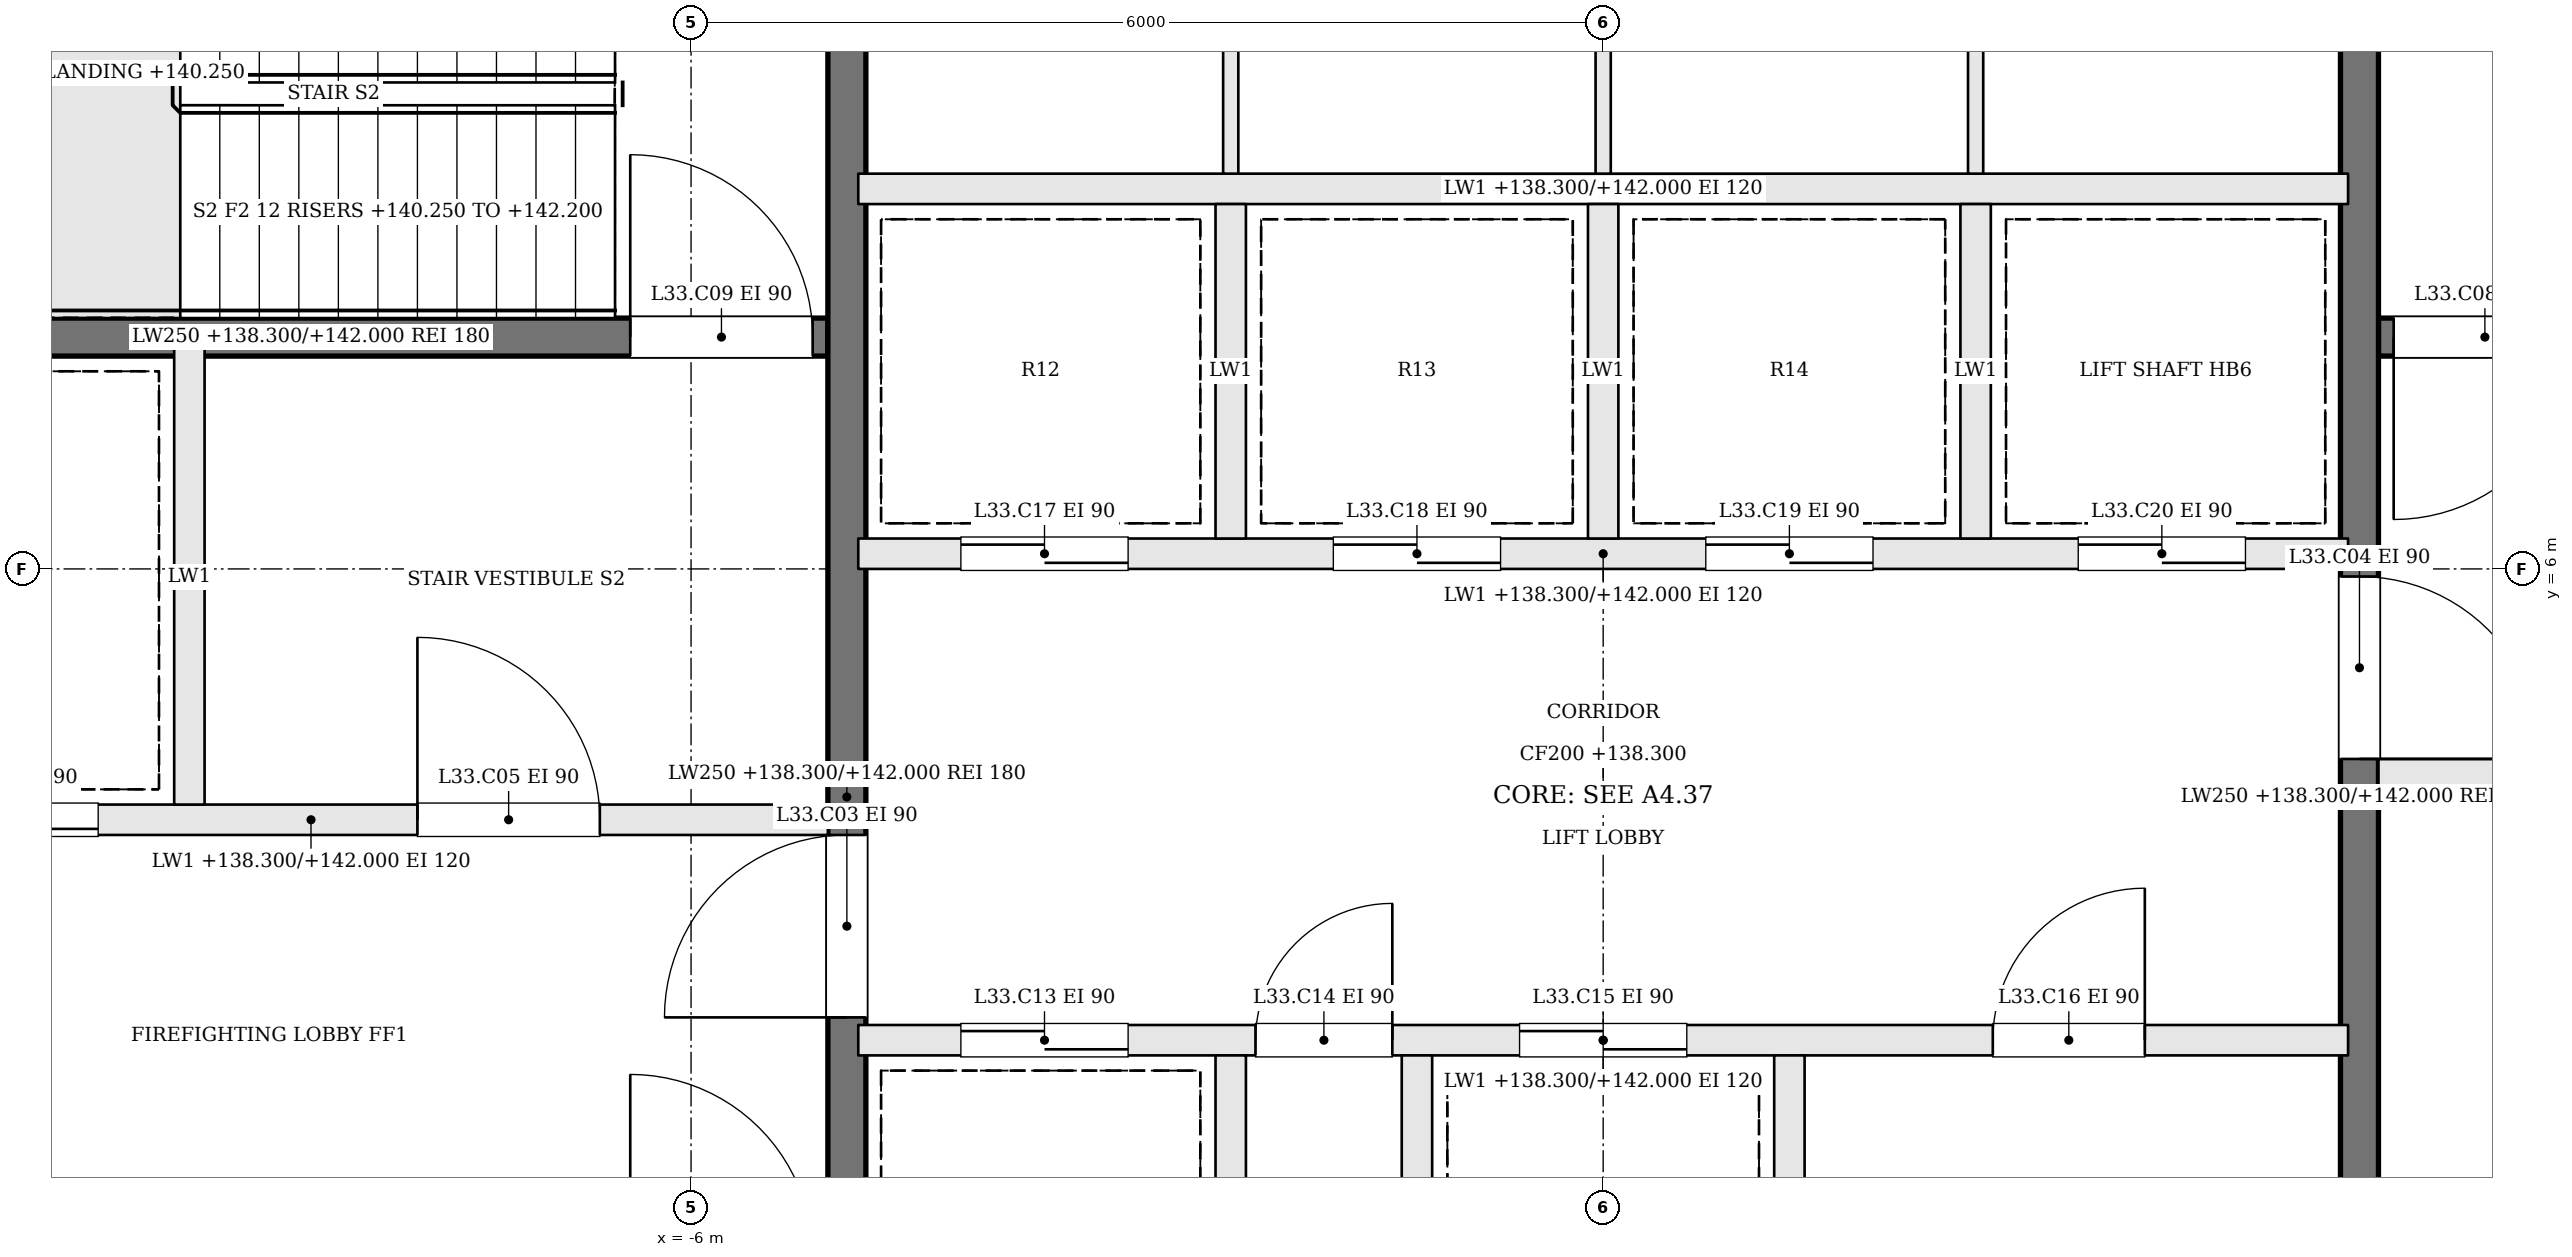
"""IFC4 building model, lengths in metres.
Left out: names, types, materials, properties, quantities, classifications, styles, units other than length and angle.
Written with IfcOpenShell. Run it as: python <this file> out.ifc"""

import sys

from ifc_helpers import new_model, si_unit, direction, frame, frame_2d, origin, place, context, subcontext, project, spatial, rectangle, extrude, element, fill, save


model = new_model("IFC4")
c1 = context("Model", 3, precision=1e-05, world=origin(), true_north=direction((0.0, 1.0)))
c2 = subcontext(c1, "Body", "Model", "MODEL_VIEW")
j1 = project(units=[si_unit("LENGTHUNIT", "METRE"), si_unit("PLANEANGLEUNIT", "RADIAN")], contexts=[c1])
p1 = place(None, origin())
s1 = spatial("IfcSite", under=j1, at=p1, CompositionType="ELEMENT")
p2 = place(p1, origin())
s2 = spatial("IfcBuilding", under=s1, at=p2, CompositionType="ELEMENT")
p3 = place(p2, frame((0.0, 0.0, 138.3)))
s3 = spatial("IfcBuildingStorey", under=s2, at=p3, CompositionType="ELEMENT", Elevation=138.3)
p4 = place(p3, frame((11.9, 7.525, 0.0), z_axis=(0.0, 0.0, 1.0), x_axis=(-1.0, 0.0, 0.0)))
e1 = element("IfcWall", 1, at=p4, inside=s3, PredefinedType="SOLIDWALL", context=c2, shape_type="SweptSolid", body=[
    extrude(rectangle(XDim=6.8, YDim=0.25, at=frame_2d((3.4, 0.0))), origin(), (0.0, 0.0, 1.0), 3.7),
])
p5 = place(p4, frame((5.5, 0.0, 0.0)))
e2 = element("IfcOpeningElement", 2, at=p5, cuts=e1, PredefinedType="OPENING", context=c2, shape_type="SweptSolid", body=[
    extrude(rectangle(XDim=1.2, YDim=2.1, at=frame_2d((0.6, 1.05))), frame((0.0, 0.135, 0.0), z_axis=(0.0, -1.0, 0.0), x_axis=(1.0, 0.0, 0.0)), (0.0, 0.0, 1.0), 0.27),
])
p6 = place(p3, frame((-11.9, 4.35, 0.0), z_axis=(0.0, 0.0, 1.0), x_axis=(1.0, 0.0, 0.0)))
e3 = element("IfcWall", 3, at=p6, inside=s3, PredefinedType="SOLIDWALL", context=c2, shape_type="SweptSolid", body=[
    extrude(rectangle(XDim=6.8, YDim=0.2, at=frame_2d((3.4, 0.0))), origin(), (0.0, 0.0, 1.0), 3.7),
])
p7 = place(p6, frame((4.1, 0.0, 0.0)))
e4 = element("IfcOpeningElement", 4, at=p7, cuts=e3, PredefinedType="OPENING", context=c2, shape_type="SweptSolid", body=[
    extrude(rectangle(XDim=1.2, YDim=2.1, at=frame_2d((0.6, 1.05))), frame((0.0, 0.11, 0.0), z_axis=(0.0, -1.0, 0.0), x_axis=(1.0, 0.0, 0.0)), (0.0, 0.0, 1.0), 0.22),
])
p8 = place(p6, frame((0.8, 0.0, 0.0)))
e5 = element("IfcOpeningElement", 5, at=p8, cuts=e3, PredefinedType="OPENING", context=c2, shape_type="SweptSolid", body=[
    extrude(rectangle(XDim=1.2, YDim=2.1, at=frame_2d((0.6, 1.05))), frame((0.0, 0.11, 0.0), z_axis=(0.0, -1.0, 0.0), x_axis=(1.0, 0.0, 0.0)), (0.0, 0.0, 1.0), 0.22),
])
p9 = place(p3, frame((11.9, 4.65, 0.0), z_axis=(0.0, 0.0, 1.0), x_axis=(-1.0, 0.0, 0.0)))
e6 = element("IfcWall", 6, at=p9, inside=s3, PredefinedType="SOLIDWALL", context=c2, shape_type="SweptSolid", body=[
    extrude(rectangle(XDim=6.8, YDim=0.2, at=frame_2d((3.4, 0.0))), origin(), (0.0, 0.0, 1.0), 3.7),
])
p10 = place(p9, frame((4.1, 0.0, 0.0)))
e7 = element("IfcOpeningElement", 7, at=p10, cuts=e6, PredefinedType="OPENING", context=c2, shape_type="SweptSolid", body=[
    extrude(rectangle(XDim=1.2, YDim=2.1, at=frame_2d((0.6, 1.05))), frame((0.0, 0.11, 0.0), z_axis=(0.0, -1.0, 0.0), x_axis=(1.0, 0.0, 0.0)), (0.0, 0.0, 1.0), 0.22),
])
p11 = place(p9, frame((0.8, 0.0, 0.0)))
e8 = element("IfcOpeningElement", 8, at=p11, cuts=e6, PredefinedType="OPENING", context=c2, shape_type="SweptSolid", body=[
    extrude(rectangle(XDim=1.2, YDim=2.1, at=frame_2d((0.6, 1.05))), frame((0.0, 0.11, 0.0), z_axis=(0.0, -1.0, 0.0), x_axis=(1.0, 0.0, 0.0)), (0.0, 0.0, 1.0), 0.22),
])
p12 = place(p3, frame((-11.9, 7.525, 0.0), z_axis=(0.0, 0.0, 1.0), x_axis=(1.0, 0.0, 0.0)))
e9 = element("IfcWall", 9, at=p12, inside=s3, PredefinedType="SOLIDWALL", context=c2, shape_type="SweptSolid", body=[
    extrude(rectangle(XDim=6.8, YDim=0.25, at=frame_2d((3.4, 0.0))), origin(), (0.0, 0.0, 1.0), 3.7),
])
p13 = place(p12, frame((5.5, 0.0, 0.0)))
e10 = element("IfcOpeningElement", 10, at=p13, cuts=e9, PredefinedType="OPENING", context=c2, shape_type="SweptSolid", body=[
    extrude(rectangle(XDim=1.2, YDim=2.1, at=frame_2d((0.6, 1.05))), frame((0.0, 0.135, 0.0), z_axis=(0.0, -1.0, 0.0), x_axis=(1.0, 0.0, 0.0)), (0.0, 0.0, 1.0), 0.27),
])
p14 = place(p3, frame((-9.3, 4.45, 0.0), z_axis=(0.0, 0.0, 1.0), x_axis=(0.0, 1.0, 0.0)))
e11 = element("IfcWall", 11, at=p14, inside=s3, PredefinedType="SOLIDWALL", context=c2, shape_type="SweptSolid", body=[
    extrude(rectangle(XDim=3.0, YDim=0.2, at=frame_2d((1.5, 0.0))), origin(), (0.0, 0.0, 1.0), 3.7),
])
p15 = place(p3, frame((-4.975, -1.9, 0.0), z_axis=(0.0, 0.0, 1.0), x_axis=(0.0, 1.0, 0.0)))
e12 = element("IfcWall", 12, at=p15, inside=s3, PredefinedType="SOLIDWALL", context=c2, shape_type="SweptSolid", body=[
    extrude(rectangle(XDim=12.8, YDim=0.25, at=frame_2d((6.4, 0.0))), origin(), (0.0, 0.0, 1.0), 3.7),
])
p16 = place(p15, frame((4.95, 0.0, 0.0)))
e13 = element("IfcOpeningElement", 13, at=p16, cuts=e12, PredefinedType="OPENING", context=c2, shape_type="SweptSolid", body=[
    extrude(rectangle(XDim=1.2, YDim=2.1, at=frame_2d((0.6, 1.05))), frame((0.0, 0.135, 0.0), z_axis=(0.0, -1.0, 0.0), x_axis=(1.0, 0.0, 0.0)), (0.0, 0.0, 1.0), 0.27),
])
p17 = place(p3, frame((4.975, 10.9, 0.0), z_axis=(0.0, 0.0, 1.0), x_axis=(0.0, -1.0, 0.0)))
e14 = element("IfcWall", 14, at=p17, inside=s3, PredefinedType="SOLIDWALL", context=c2, shape_type="SweptSolid", body=[
    extrude(rectangle(XDim=12.8, YDim=0.25, at=frame_2d((6.4, 0.0))), origin(), (0.0, 0.0, 1.0), 3.7),
])
p18 = place(p17, frame((4.95, 0.0, 0.0)))
e15 = element("IfcOpeningElement", 15, at=p18, cuts=e14, PredefinedType="OPENING", context=c2, shape_type="SweptSolid", body=[
    extrude(rectangle(XDim=1.2, YDim=2.1, at=frame_2d((0.6, 1.05))), frame((0.0, 0.135, 0.0), z_axis=(0.0, -1.0, 0.0), x_axis=(1.0, 0.0, 0.0)), (0.0, 0.0, 1.0), 0.27),
])
p19 = place(p3, frame((-4.9, 2.9, 0.0), z_axis=(0.0, 0.0, 1.0), x_axis=(1.0, 0.0, 0.0)))
e16 = element("IfcWall", 16, at=p19, inside=s3, PredefinedType="SOLIDWALL", context=c2, shape_type="SweptSolid", body=[
    extrude(rectangle(XDim=9.8, YDim=0.2, at=frame_2d((4.9, 0.0))), origin(), (0.0, 0.0, 1.0), 3.7),
])
p20 = place(p19, frame((0.675, 0.0, 0.0)))
e17 = element("IfcOpeningElement", 17, at=p20, cuts=e16, PredefinedType="OPENING", context=c2, shape_type="SweptSolid", body=[
    extrude(rectangle(XDim=1.1, YDim=2.1, at=frame_2d((0.55, 1.05))), frame((0.0, 0.11, 0.0), z_axis=(0.0, -1.0, 0.0), x_axis=(1.0, 0.0, 0.0)), (0.0, 0.0, 1.0), 0.22),
])
p21 = place(p19, frame((2.613, 0.0, 0.0)))
e18 = element("IfcOpeningElement", 18, at=p21, cuts=e16, PredefinedType="OPENING", context=c2, shape_type="SweptSolid", body=[
    extrude(rectangle(XDim=0.9, YDim=2.1, at=frame_2d((0.45, 1.05))), frame((0.0, 0.11, 0.0), z_axis=(0.0, -1.0, 0.0), x_axis=(1.0, 0.0, 0.0)), (0.0, 0.0, 1.0), 0.22),
])
p22 = place(p19, frame((4.35, 0.0, 0.0)))
e19 = element("IfcOpeningElement", 19, at=p22, cuts=e16, PredefinedType="OPENING", context=c2, shape_type="SweptSolid", body=[
    extrude(rectangle(XDim=1.1, YDim=2.1, at=frame_2d((0.55, 1.05))), frame((0.0, 0.11, 0.0), z_axis=(0.0, -1.0, 0.0), x_axis=(1.0, 0.0, 0.0)), (0.0, 0.0, 1.0), 0.22),
])
p23 = place(p19, frame((7.463, 0.0, 0.0)))
e20 = element("IfcOpeningElement", 20, at=p23, cuts=e16, PredefinedType="OPENING", context=c2, shape_type="SweptSolid", body=[
    extrude(rectangle(XDim=1.0, YDim=2.1, at=frame_2d((0.5, 1.05))), frame((0.0, 0.11, 0.0), z_axis=(0.0, -1.0, 0.0), x_axis=(1.0, 0.0, 0.0)), (0.0, 0.0, 1.0), 0.22),
])
p24 = place(p3, frame((-4.9, 6.1, 0.0), z_axis=(0.0, 0.0, 1.0), x_axis=(1.0, 0.0, 0.0)))
e21 = element("IfcWall", 21, at=p24, inside=s3, PredefinedType="SOLIDWALL", context=c2, shape_type="SweptSolid", body=[
    extrude(rectangle(XDim=9.8, YDim=0.2, at=frame_2d((4.9, 0.0))), origin(), (0.0, 0.0, 1.0), 3.7),
])
p25 = place(p24, frame((0.675, 0.0, 0.0)))
e22 = element("IfcOpeningElement", 22, at=p25, cuts=e21, PredefinedType="OPENING", context=c2, shape_type="SweptSolid", body=[
    extrude(rectangle(XDim=1.1, YDim=2.1, at=frame_2d((0.55, 1.05))), frame((0.0, 0.11, 0.0), z_axis=(0.0, -1.0, 0.0), x_axis=(1.0, 0.0, 0.0)), (0.0, 0.0, 1.0), 0.22),
])
p26 = place(p24, frame((3.125, 0.0, 0.0)))
e23 = element("IfcOpeningElement", 23, at=p26, cuts=e21, PredefinedType="OPENING", context=c2, shape_type="SweptSolid", body=[
    extrude(rectangle(XDim=1.1, YDim=2.1, at=frame_2d((0.55, 1.05))), frame((0.0, 0.11, 0.0), z_axis=(0.0, -1.0, 0.0), x_axis=(1.0, 0.0, 0.0)), (0.0, 0.0, 1.0), 0.22),
])
p27 = place(p24, frame((5.575, 0.0, 0.0)))
e24 = element("IfcOpeningElement", 24, at=p27, cuts=e21, PredefinedType="OPENING", context=c2, shape_type="SweptSolid", body=[
    extrude(rectangle(XDim=1.1, YDim=2.1, at=frame_2d((0.55, 1.05))), frame((0.0, 0.11, 0.0), z_axis=(0.0, -1.0, 0.0), x_axis=(1.0, 0.0, 0.0)), (0.0, 0.0, 1.0), 0.22),
])
p28 = place(p24, frame((8.025, 0.0, 0.0)))
e25 = element("IfcOpeningElement", 25, at=p28, cuts=e21, PredefinedType="OPENING", context=c2, shape_type="SweptSolid", body=[
    extrude(rectangle(XDim=1.1, YDim=2.1, at=frame_2d((0.55, 1.05))), frame((0.0, 0.11, 0.0), z_axis=(0.0, -1.0, 0.0), x_axis=(1.0, 0.0, 0.0)), (0.0, 0.0, 1.0), 0.22),
])
p29 = place(p3, frame((-4.9, 8.5, 0.0), z_axis=(0.0, 0.0, 1.0), x_axis=(1.0, 0.0, 0.0)))
e26 = element("IfcWall", 26, at=p29, inside=s3, PredefinedType="SOLIDWALL", context=c2, shape_type="SweptSolid", body=[
    extrude(rectangle(XDim=9.8, YDim=0.2, at=frame_2d((4.9, 0.0))), origin(), (0.0, 0.0, 1.0), 3.7),
])
for number, where, z_axis, x_axis in (
    (27, (-2.45, 0.6, 0.0), (0.0, 0.0, 1.0), (0.0, 1.0, 0.0)),
    (28, (-1.225, 0.6, 0.0), (0.0, 0.0, 1.0), (0.0, 1.0, 0.0)),
    (29, (1.225, 0.6, 0.0), (0.0, 0.0, 1.0), (0.0, 1.0, 0.0)),
    (30, (-2.45, 6.2, 0.0), (0.0, 0.0, 1.0), (0.0, 1.0, 0.0)),
    (31, (0.0, 6.2, 0.0), (0.0, 0.0, 1.0), (0.0, 1.0, 0.0)),
    (32, (2.45, 6.2, 0.0), (0.0, 0.0, 1.0), (0.0, 1.0, 0.0)),
):
    element("IfcWall", number, at=place(p3, frame(where, z_axis=z_axis, x_axis=x_axis)), inside=s3, PredefinedType="SOLIDWALL", context=c2, shape_type="SweptSolid", body=[
        extrude(rectangle(XDim=2.2, YDim=0.2, at=frame_2d((1.1, 0.0))), origin(), (0.0, 0.0, 1.0), 3.7),
    ])
for number, where, z_axis, x_axis in (
    (33, (-2.45, 8.6, 0.0), (0.0, 0.0, 1.0), (0.0, 1.0, 0.0)),
    (34, (0.0, 8.6, 0.0), (0.0, 0.0, 1.0), (0.0, 1.0, 0.0)),
    (35, (2.45, 8.6, 0.0), (0.0, 0.0, 1.0), (0.0, 1.0, 0.0)),
):
    element("IfcWall", number, at=place(p3, frame(where, z_axis=z_axis, x_axis=x_axis)), inside=s3, PredefinedType="PARTITIONING", context=c2, shape_type="SweptSolid", body=[
        extrude(rectangle(XDim=2.3, YDim=0.1, at=frame_2d((1.15, 0.0))), origin(), (0.0, 0.0, 1.0), 3.7),
    ])
p30 = place(p16, origin())
e36 = element("IfcDoor", 36, at=p30, inside=s3, OperationType="SINGLE_SWING_LEFT", PredefinedType="DOOR", context=c2, shape_type="SweptSolid", body=[
    extrude(rectangle(XDim=1.2, YDim=2.1, at=frame_2d((0.6, 1.05))), frame((0.0, 0.025, 0.0), z_axis=(0.0, -1.0, 0.0), x_axis=(1.0, 0.0, 0.0)), (0.0, 0.0, 1.0), 0.05),
])
fill(e13, e36)
p31 = place(p18, origin())
e37 = element("IfcDoor", 37, at=p31, inside=s3, OperationType="SINGLE_SWING_RIGHT", PredefinedType="DOOR", context=c2, shape_type="SweptSolid", body=[
    extrude(rectangle(XDim=1.2, YDim=2.1, at=frame_2d((0.6, 1.05))), frame((0.0, 0.025, 0.0), z_axis=(0.0, -1.0, 0.0), x_axis=(1.0, 0.0, 0.0)), (0.0, 0.0, 1.0), 0.05),
])
fill(e15, e37)
p32 = place(p7, origin())
e38 = element("IfcDoor", 38, at=p32, inside=s3, OperationType="SINGLE_SWING_LEFT", PredefinedType="DOOR", context=c2, shape_type="SweptSolid", body=[
    extrude(rectangle(XDim=1.2, YDim=2.1, at=frame_2d((0.6, 1.05))), frame((0.0, 0.025, 0.0), z_axis=(0.0, -1.0, 0.0), x_axis=(1.0, 0.0, 0.0)), (0.0, 0.0, 1.0), 0.05),
])
fill(e4, e38)
p33 = place(p5, origin())
e39 = element("IfcDoor", 39, at=p33, inside=s3, OperationType="SINGLE_SWING_RIGHT", PredefinedType="DOOR", context=c2, shape_type="SweptSolid", body=[
    extrude(rectangle(XDim=1.2, YDim=2.1, at=frame_2d((0.6, 1.05))), frame((0.0, 0.025, 0.0), z_axis=(0.0, -1.0, 0.0), x_axis=(1.0, 0.0, 0.0)), (0.0, 0.0, 1.0), 0.05),
])
fill(e2, e39)
p34 = place(p13, origin())
e40 = element("IfcDoor", 40, at=p34, inside=s3, OperationType="SINGLE_SWING_LEFT", PredefinedType="DOOR", context=c2, shape_type="SweptSolid", body=[
    extrude(rectangle(XDim=1.2, YDim=2.1, at=frame_2d((0.6, 1.05))), frame((0.0, 0.025, 0.0), z_axis=(0.0, -1.0, 0.0), x_axis=(1.0, 0.0, 0.0)), (0.0, 0.0, 1.0), 0.05),
])
fill(e10, e40)
p35 = place(p8, origin())
e41 = element("IfcDoor", 41, at=p35, inside=s3, OperationType="SLIDING_TO_RIGHT", PredefinedType="DOOR", context=c2, shape_type="SweptSolid", body=[
    extrude(rectangle(XDim=1.2, YDim=2.1, at=frame_2d((0.6, 1.05))), frame((0.0, 0.025, 0.0), z_axis=(0.0, -1.0, 0.0), x_axis=(1.0, 0.0, 0.0)), (0.0, 0.0, 1.0), 0.05),
])
fill(e5, e41)
p36 = place(p20, origin())
e42 = element("IfcDoor", 42, at=p36, inside=s3, OperationType="SLIDING_TO_RIGHT", PredefinedType="DOOR", context=c2, shape_type="SweptSolid", body=[
    extrude(rectangle(XDim=1.1, YDim=2.1, at=frame_2d((0.55, 1.05))), frame((0.0, 0.025, 0.0), z_axis=(0.0, -1.0, 0.0), x_axis=(1.0, 0.0, 0.0)), (0.0, 0.0, 1.0), 0.05),
])
fill(e17, e42)
p37 = place(p21, origin())
e43 = element("IfcDoor", 43, at=p37, inside=s3, OperationType="SINGLE_SWING_RIGHT", PredefinedType="DOOR", context=c2, shape_type="SweptSolid", body=[
    extrude(rectangle(XDim=0.9, YDim=2.1, at=frame_2d((0.45, 1.05))), frame((0.0, 0.025, 0.0), z_axis=(0.0, -1.0, 0.0), x_axis=(1.0, 0.0, 0.0)), (0.0, 0.0, 1.0), 0.05),
])
fill(e18, e43)
p38 = place(p22, origin())
e44 = element("IfcDoor", 44, at=p38, inside=s3, OperationType="SLIDING_TO_LEFT", PredefinedType="DOOR", context=c2, shape_type="SweptSolid", body=[
    extrude(rectangle(XDim=1.1, YDim=2.1, at=frame_2d((0.55, 1.05))), frame((0.0, 0.025, 0.0), z_axis=(0.0, -1.0, 0.0), x_axis=(1.0, 0.0, 0.0)), (0.0, 0.0, 1.0), 0.05),
])
fill(e19, e44)
p39 = place(p23, origin())
e45 = element("IfcDoor", 45, at=p39, inside=s3, OperationType="SINGLE_SWING_RIGHT", PredefinedType="DOOR", context=c2, shape_type="SweptSolid", body=[
    extrude(rectangle(XDim=1.0, YDim=2.1, at=frame_2d((0.5, 1.05))), frame((0.0, 0.025, 0.0), z_axis=(0.0, -1.0, 0.0), x_axis=(1.0, 0.0, 0.0)), (0.0, 0.0, 1.0), 0.05),
])
fill(e20, e45)
p40 = place(p25, origin())
e46 = element("IfcDoor", 46, at=p40, inside=s3, OperationType="SLIDING_TO_RIGHT", PredefinedType="DOOR", context=c2, shape_type="SweptSolid", body=[
    extrude(rectangle(XDim=1.1, YDim=2.1, at=frame_2d((0.55, 1.05))), frame((0.0, 0.025, 0.0), z_axis=(0.0, -1.0, 0.0), x_axis=(1.0, 0.0, 0.0)), (0.0, 0.0, 1.0), 0.05),
])
fill(e22, e46)
p41 = place(p26, origin())
e47 = element("IfcDoor", 47, at=p41, inside=s3, OperationType="SLIDING_TO_LEFT", PredefinedType="DOOR", context=c2, shape_type="SweptSolid", body=[
    extrude(rectangle(XDim=1.1, YDim=2.1, at=frame_2d((0.55, 1.05))), frame((0.0, 0.025, 0.0), z_axis=(0.0, -1.0, 0.0), x_axis=(1.0, 0.0, 0.0)), (0.0, 0.0, 1.0), 0.05),
])
fill(e23, e47)
p42 = place(p27, origin())
e48 = element("IfcDoor", 48, at=p42, inside=s3, OperationType="SLIDING_TO_RIGHT", PredefinedType="DOOR", context=c2, shape_type="SweptSolid", body=[
    extrude(rectangle(XDim=1.1, YDim=2.1, at=frame_2d((0.55, 1.05))), frame((0.0, 0.025, 0.0), z_axis=(0.0, -1.0, 0.0), x_axis=(1.0, 0.0, 0.0)), (0.0, 0.0, 1.0), 0.05),
])
fill(e24, e48)
p43 = place(p28, origin())
e49 = element("IfcDoor", 49, at=p43, inside=s3, OperationType="SLIDING_TO_LEFT", PredefinedType="DOOR", context=c2, shape_type="SweptSolid", body=[
    extrude(rectangle(XDim=1.1, YDim=2.1, at=frame_2d((0.55, 1.05))), frame((0.0, 0.025, 0.0), z_axis=(0.0, -1.0, 0.0), x_axis=(1.0, 0.0, 0.0)), (0.0, 0.0, 1.0), 0.05),
])
fill(e25, e49)
save(model, sys.argv[1])
